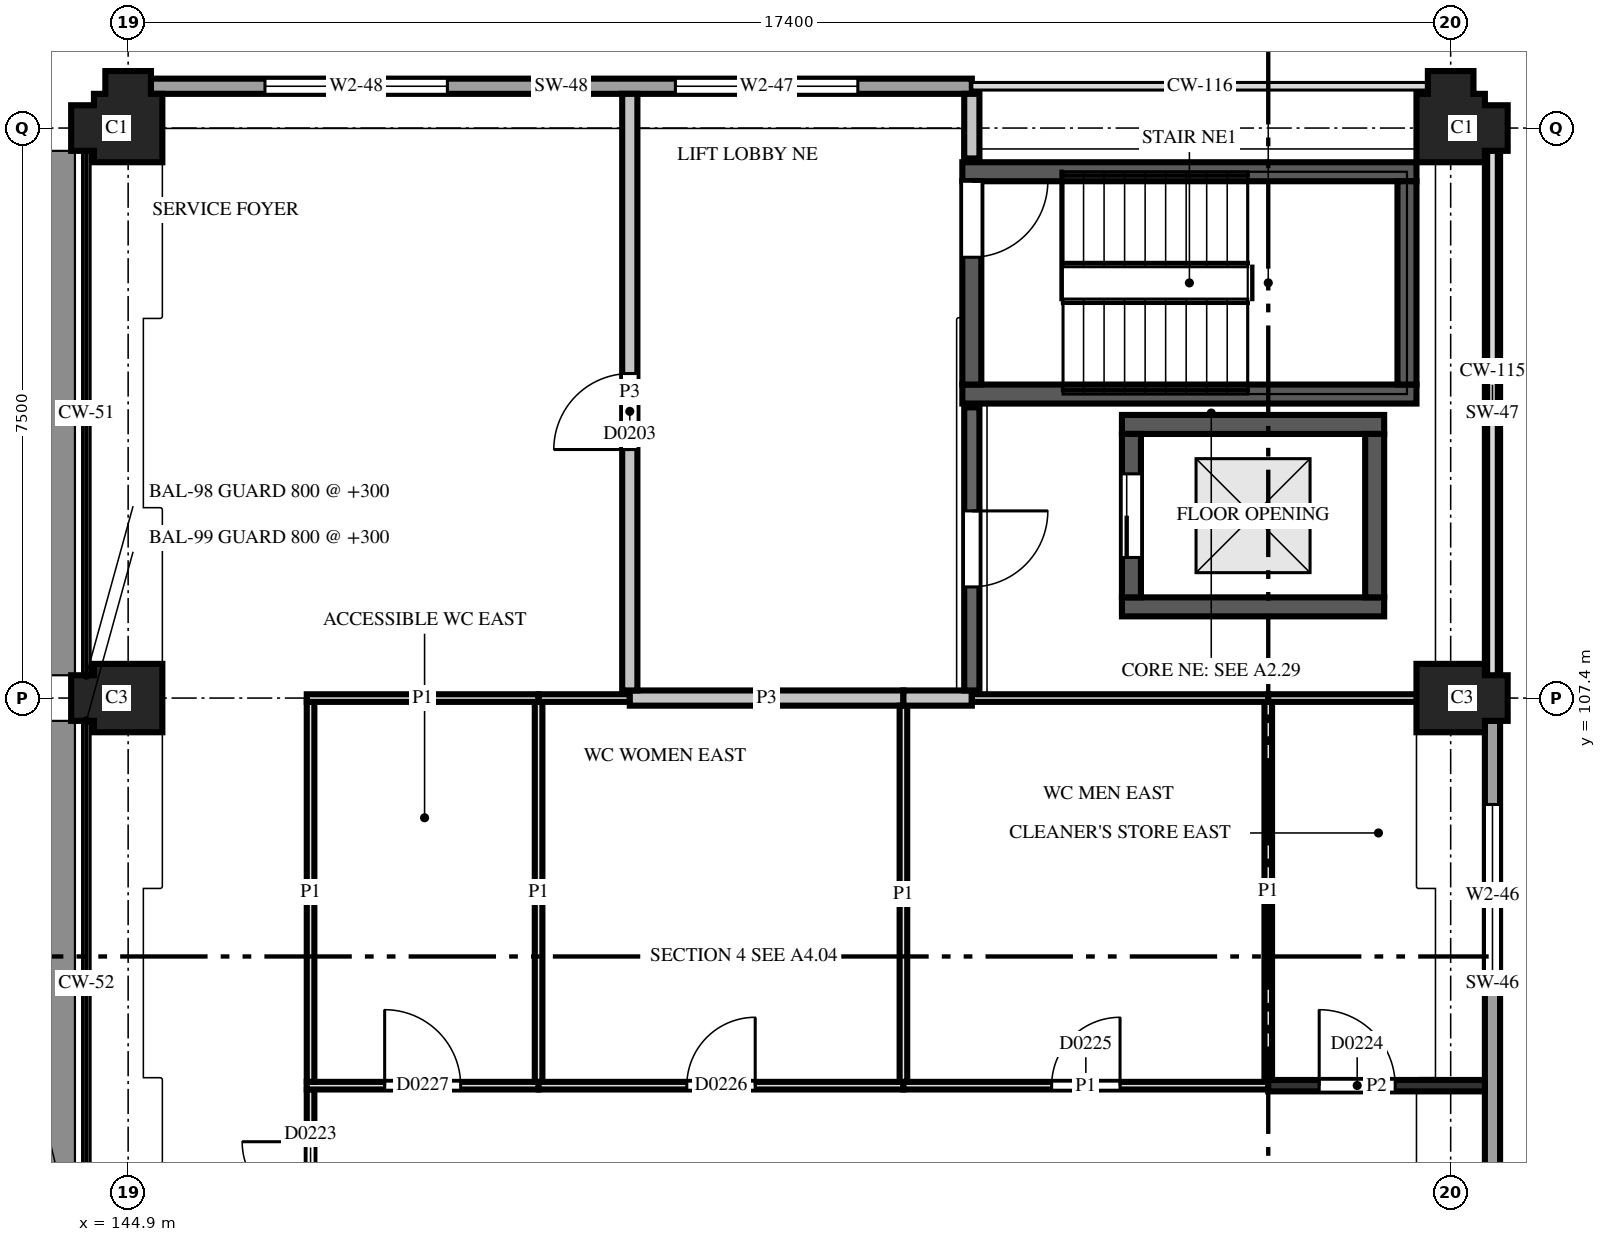
"""IFC4 building model, lengths in metres.
Left out: names, types, materials, properties, quantities, classifications, styles, units other than length and angle.
Written with IfcOpenShell. Run it as: python <this file> out.ifc"""

import sys

from ifc_helpers import new_model, si_unit, direction, frame, frame_2d, origin, place, context, subcontext, project, spatial, polyline, rectangle, outline, extrude, element, fill, save


model = new_model("IFC4")
c1 = context("Model", 3, precision=1e-05, world=origin(), true_north=direction((0.0, 1.0)))
c2 = subcontext(c1, "Body", "Model", "MODEL_VIEW")
j1 = project(units=[si_unit("LENGTHUNIT", "METRE"), si_unit("PLANEANGLEUNIT", "RADIAN")], contexts=[c1])
p1 = place(None, origin())
s1 = spatial("IfcSite", under=j1, at=p1, CompositionType="ELEMENT")
p2 = place(p1, origin())
s2 = spatial("IfcBuilding", under=s1, at=p2, CompositionType="ELEMENT")
p3 = place(p2, frame((0.0, 0.0, 8.2)))
s3 = spatial("IfcBuildingStorey", under=s2, at=p3, CompositionType="ELEMENT", Elevation=8.2)
for number, where, z_axis, x_axis in (
    (1, (144.9, 107.4, 0.0), (0.0, 0.0, 1.0), (-1.0, 0.0, 0.0)),
    (2, (162.3, 107.4, 0.0), (0.0, 0.0, 1.0), (1.0, 0.0, 0.0)),
):
    element("IfcColumn", number, at=place(p3, frame(where, z_axis=z_axis, x_axis=x_axis)), inside=s3, PredefinedType="COLUMN", context=c2, shape_type="SweptSolid", body=[
        extrude(outline(polyline([(-0.45, -0.45), (0.45, -0.45), (0.45, -0.3), (0.75, -0.3), (0.75, 0.3), (0.45, 0.3), (0.45, 0.45), (-0.45, 0.45), (-0.45, -0.45)])), origin(), (0.0, 0.0, 1.0), 3.7),
    ])
for number, where, z_axis, x_axis in (
    (3, (144.9, 114.9, 0.0), (0.0, 0.0, 1.0), (0.0, 1.0, 0.0)),
    (4, (162.3, 114.9, 0.0), (0.0, 0.0, 1.0), (1.0, 0.0, 0.0)),
):
    element("IfcColumn", number, at=place(p3, frame(where, z_axis=z_axis, x_axis=x_axis)), inside=s3, PredefinedType="COLUMN", context=c2, shape_type="SweptSolid", body=[
        extrude(outline(polyline([(-0.45, -0.45), (0.45, -0.45), (0.45, -0.3), (0.75, -0.3), (0.75, 0.3), (0.45, 0.3), (0.45, 0.45), (0.3, 0.45), (0.3, 0.75), (-0.3, 0.75), (-0.3, 0.45), (-0.45, 0.45), (-0.45, -0.45)])), origin(), (0.0, 0.0, 1.0), 3.7),
    ])
for number, where, z_axis, x_axis in (
    (5, (157.975, 108.6, 0.0), (0.0, 0.0, 1.0), (1.0, 0.0, 0.0)),
    (6, (157.975, 111.0, 0.0), (0.0, 0.0, 1.0), (1.0, 0.0, 0.0)),
):
    element("IfcWall", number, at=place(p3, frame(where, z_axis=z_axis, x_axis=x_axis)), inside=s3, PredefinedType="SHEAR", context=c2, shape_type="SweptSolid", body=[
        extrude(rectangle(XDim=3.45, YDim=0.25, at=frame_2d((1.725, 0.0))), origin(), (0.0, 0.0, 1.0), 3.7),
    ])
for number, where, z_axis, x_axis in (
    (7, (155.875, 111.4, 0.0), (0.0, 0.0, 1.0), (1.0, 0.0, 0.0)),
    (8, (155.875, 114.325, 0.0), (0.0, 0.0, 1.0), (1.0, 0.0, 0.0)),
):
    element("IfcWall", number, at=place(p3, frame(where, z_axis=z_axis, x_axis=x_axis)), inside=s3, PredefinedType="SHEAR", context=c2, shape_type="SweptSolid", body=[
        extrude(rectangle(XDim=5.975, YDim=0.25, at=frame_2d((2.988, 0.0))), origin(), (0.0, 0.0, 1.0), 3.7),
    ])
p4 = place(p3, frame((156.0, 111.525, 0.0), z_axis=(0.0, 0.0, 1.0), x_axis=(0.0, 1.0, 0.0)))
e9 = element("IfcWall", 9, at=p4, inside=s3, PredefinedType="SHEAR", context=c2, shape_type="SweptSolid", body=[
    extrude(rectangle(XDim=2.675, YDim=0.25, at=frame_2d((1.337, 0.0))), origin(), (0.0, 0.0, 1.0), 3.7),
])
p5 = place(p4, frame((1.675, 0.0, 0.0)))
e10 = element("IfcOpeningElement", 10, at=p5, cuts=e9, PredefinedType="OPENING", context=c2, shape_type="SweptSolid", body=[
    extrude(rectangle(XDim=1.0, YDim=2.1, at=frame_2d((0.5, 1.05))), frame((0.0, 0.135, 0.0), z_axis=(0.0, -1.0, 0.0), x_axis=(1.0, 0.0, 0.0)), (0.0, 0.0, 1.0), 0.27),
])
p6 = place(p3, frame((158.1, 108.725, 0.0), z_axis=(0.0, 0.0, 1.0), x_axis=(0.0, 1.0, 0.0)))
e11 = element("IfcWall", 11, at=p6, inside=s3, PredefinedType="SHEAR", context=c2, shape_type="SweptSolid", body=[
    extrude(rectangle(XDim=2.15, YDim=0.25, at=frame_2d((1.075, 0.0))), origin(), (0.0, 0.0, 1.0), 3.7),
])
p7 = place(p6, frame((0.525, 0.0, 0.0)))
e12 = element("IfcOpeningElement", 12, at=p7, cuts=e11, PredefinedType="OPENING", context=c2, shape_type="SweptSolid", body=[
    extrude(rectangle(XDim=1.1, YDim=2.1, at=frame_2d((0.55, 1.05))), frame((0.0, 0.135, 0.0), z_axis=(0.0, -1.0, 0.0), x_axis=(1.0, 0.0, 0.0)), (0.0, 0.0, 1.0), 0.27),
])
p8 = place(p3, frame((161.3, 108.725, 0.0), z_axis=(0.0, 0.0, 1.0), x_axis=(0.0, 1.0, 0.0)))
e13 = element("IfcWall", 13, at=p8, inside=s3, PredefinedType="SHEAR", context=c2, shape_type="SweptSolid", body=[
    extrude(rectangle(XDim=2.15, YDim=0.25, at=frame_2d((1.075, 0.0))), origin(), (0.0, 0.0, 1.0), 3.7),
])
p9 = place(p3, frame((161.725, 111.525, 0.0), z_axis=(0.0, 0.0, 1.0), x_axis=(0.0, 1.0, 0.0)))
e14 = element("IfcWall", 14, at=p9, inside=s3, PredefinedType="SHEAR", context=c2, shape_type="SweptSolid", body=[
    extrude(rectangle(XDim=2.675, YDim=0.25, at=frame_2d((1.337, 0.0))), origin(), (0.0, 0.0, 1.0), 3.7),
])
p10 = place(p3, frame((162.85, 100.2, 0.0), z_axis=(0.0, 0.0, 1.0), x_axis=(0.0, 1.0, 0.0)))
e15 = element("IfcWall", 15, at=p10, inside=s3, PredefinedType="SOLIDWALL", context=c2, shape_type="SweptSolid", body=[
    extrude(rectangle(XDim=6.9, YDim=0.2, at=frame_2d((3.45, 0.0))), origin(), (0.0, 0.0, 1.0), 2.3),
])
p11 = place(p10, frame((3.4, 0.0, 0.55)))
e16 = element("IfcOpeningElement", 16, at=p11, cuts=e15, PredefinedType="OPENING", context=c2, shape_type="SweptSolid", body=[
    extrude(rectangle(XDim=2.4, YDim=1.0, at=frame_2d((1.2, 0.5))), frame((0.0, 0.11, 0.0), z_axis=(0.0, -1.0, 0.0), x_axis=(1.0, 0.0, 0.0)), (0.0, 0.0, 1.0), 0.22),
])
p12 = place(p3, frame((162.85, 107.7, 0.0), z_axis=(0.0, 0.0, 1.0), x_axis=(0.0, 1.0, 0.0)))
e17 = element("IfcWall", 17, at=p12, inside=s3, PredefinedType="SOLIDWALL", context=c2, shape_type="SweptSolid", body=[
    extrude(rectangle(XDim=6.9, YDim=0.2, at=frame_2d((3.45, 0.0))), origin(), (0.0, 0.0, 1.0), 2.3),
])
p13 = place(p3, frame((156.0, 115.45, 0.0), z_axis=(0.0, 0.0, 1.0), x_axis=(-1.0, 0.0, 0.0)))
e18 = element("IfcWall", 18, at=p13, inside=s3, PredefinedType="SOLIDWALL", context=c2, shape_type="SweptSolid", body=[
    extrude(rectangle(XDim=10.8, YDim=0.2, at=frame_2d((5.4, 0.0))), origin(), (0.0, 0.0, 1.0), 1.7),
])
p14 = place(p13, frame((1.5, 0.0, 0.55)))
e19 = element("IfcOpeningElement", 19, at=p14, cuts=e18, PredefinedType="OPENING", context=c2, shape_type="SweptSolid", body=[
    extrude(rectangle(XDim=2.4, YDim=1.0, at=frame_2d((1.2, 0.5))), frame((0.0, 0.11, 0.0), z_axis=(0.0, -1.0, 0.0), x_axis=(1.0, 0.0, 0.0)), (0.0, 0.0, 1.0), 0.22),
])
p15 = place(p13, frame((6.9, 0.0, 0.55)))
e20 = element("IfcOpeningElement", 20, at=p15, cuts=e18, PredefinedType="OPENING", context=c2, shape_type="SweptSolid", body=[
    extrude(rectangle(XDim=2.4, YDim=1.0, at=frame_2d((1.2, 0.5))), frame((0.0, 0.11, 0.0), z_axis=(0.0, -1.0, 0.0), x_axis=(1.0, 0.0, 0.0)), (0.0, 0.0, 1.0), 0.22),
])
p16 = place(p3, frame((147.3, 102.25, 0.0), z_axis=(0.0, 0.0, 1.0), x_axis=(0.0, -1.0, 0.0)))
e21 = element("IfcWall", 21, at=p16, inside=s3, PredefinedType="PARTITIONING", context=c2, shape_type="SweptSolid", body=[
    extrude(rectangle(XDim=2.275, YDim=0.1, at=frame_2d((1.137, 0.0))), origin(), (0.0, 0.0, 1.0), 2.88),
])
p17 = place(p16, frame((0.688, 0.0, 0.0)))
e22 = element("IfcOpeningElement", 22, at=p17, cuts=e21, PredefinedType="OPENING", context=c2, shape_type="SweptSolid", body=[
    extrude(rectangle(XDim=0.9, YDim=2.1, at=frame_2d((0.45, 1.05))), frame((0.0, 0.06, 0.0), z_axis=(0.0, -1.0, 0.0), x_axis=(1.0, 0.0, 0.0)), (0.0, 0.0, 1.0), 0.12),
])
p18 = place(p3, frame((150.3, 102.3, 0.0), z_axis=(0.0, 0.0, 1.0), x_axis=(-1.0, 0.0, 0.0)))
e23 = element("IfcWall", 23, at=p18, inside=s3, PredefinedType="PARTITIONING", context=c2, shape_type="SweptSolid", body=[
    extrude(rectangle(XDim=3.05, YDim=0.1, at=frame_2d((1.525, 0.0))), origin(), (0.0, 0.0, 1.0), 2.88),
])
p19 = place(p18, frame((1.025, 0.0, 0.0)))
e24 = element("IfcOpeningElement", 24, at=p19, cuts=e23, PredefinedType="OPENING", context=c2, shape_type="SweptSolid", body=[
    extrude(rectangle(XDim=1.0, YDim=2.1, at=frame_2d((0.5, 1.05))), frame((0.0, 0.06, 0.0), z_axis=(0.0, -1.0, 0.0), x_axis=(1.0, 0.0, 0.0)), (0.0, 0.0, 1.0), 0.12),
])
p20 = place(p3, frame((155.1, 102.3, 0.0), z_axis=(0.0, 0.0, 1.0), x_axis=(-1.0, 0.0, 0.0)))
e25 = element("IfcWall", 25, at=p20, inside=s3, PredefinedType="PARTITIONING", context=c2, shape_type="SweptSolid", body=[
    extrude(rectangle(XDim=4.8, YDim=0.1, at=frame_2d((2.4, 0.0))), origin(), (0.0, 0.0, 1.0), 2.88),
])
p21 = place(p20, frame((1.95, 0.0, 0.0)))
e26 = element("IfcOpeningElement", 26, at=p21, cuts=e25, PredefinedType="OPENING", context=c2, shape_type="SweptSolid", body=[
    extrude(rectangle(XDim=0.9, YDim=2.1, at=frame_2d((0.45, 1.05))), frame((0.0, 0.06, 0.0), z_axis=(0.0, -1.0, 0.0), x_axis=(1.0, 0.0, 0.0)), (0.0, 0.0, 1.0), 0.12),
])
p22 = place(p3, frame((159.9, 102.3, 0.0), z_axis=(0.0, 0.0, 1.0), x_axis=(-1.0, 0.0, 0.0)))
e27 = element("IfcWall", 27, at=p22, inside=s3, PredefinedType="PARTITIONING", context=c2, shape_type="SweptSolid", body=[
    extrude(rectangle(XDim=4.8, YDim=0.1, at=frame_2d((2.4, 0.0))), origin(), (0.0, 0.0, 1.0), 2.88),
])
p23 = place(p22, frame((1.95, 0.0, 0.0)))
e28 = element("IfcOpeningElement", 28, at=p23, cuts=e27, PredefinedType="OPENING", context=c2, shape_type="SweptSolid", body=[
    extrude(rectangle(XDim=0.9, YDim=2.1, at=frame_2d((0.45, 1.05))), frame((0.0, 0.06, 0.0), z_axis=(0.0, -1.0, 0.0), x_axis=(1.0, 0.0, 0.0)), (0.0, 0.0, 1.0), 0.12),
])
p24 = place(p3, frame((162.75, 102.3, 0.0), z_axis=(0.0, 0.0, 1.0), x_axis=(-1.0, 0.0, 0.0)))
e29 = element("IfcWall", 29, at=p24, inside=s3, PredefinedType="PARTITIONING", context=c2, shape_type="SweptSolid", body=[
    extrude(rectangle(XDim=2.85, YDim=0.15, at=frame_2d((1.425, 0.0))), origin(), (0.0, 0.0, 1.0), 2.88),
])
p25 = place(p24, frame((1.18, 0.0, 0.0)))
e30 = element("IfcOpeningElement", 30, at=p25, cuts=e29, PredefinedType="OPENING", context=c2, shape_type="SweptSolid", body=[
    extrude(rectangle(XDim=1.0, YDim=2.1, at=frame_2d((0.5, 1.05))), frame((0.0, 0.085, 0.0), z_axis=(0.0, -1.0, 0.0), x_axis=(1.0, 0.0, 0.0)), (0.0, 0.0, 1.0), 0.17),
])
for number, where, z_axis, x_axis in (
    (31, (147.3, 107.35, 0.0), (0.0, 0.0, 1.0), (0.0, -1.0, 0.0)),
    (32, (150.3, 107.35, 0.0), (0.0, 0.0, 1.0), (0.0, -1.0, 0.0)),
):
    element("IfcWall", number, at=place(p3, frame(where, z_axis=z_axis, x_axis=x_axis)), inside=s3, PredefinedType="PARTITIONING", context=c2, shape_type="SweptSolid", body=[
        extrude(rectangle(XDim=5.0, YDim=0.1, at=frame_2d((2.5, 0.0))), origin(), (0.0, 0.0, 1.0), 2.88),
    ])
p26 = place(p3, frame((150.3, 107.4, 0.0), z_axis=(0.0, 0.0, 1.0), x_axis=(-1.0, 0.0, 0.0)))
e33 = element("IfcWall", 33, at=p26, inside=s3, PredefinedType="PARTITIONING", context=c2, shape_type="SweptSolid", body=[
    extrude(rectangle(XDim=3.05, YDim=0.1, at=frame_2d((1.525, 0.0))), origin(), (0.0, 0.0, 1.0), 2.88),
])
p27 = place(p3, frame((151.5, 107.4, 0.0), z_axis=(0.0, 0.0, 1.0), x_axis=(-1.0, 0.0, 0.0)))
e34 = element("IfcWall", 34, at=p27, inside=s3, PredefinedType="PARTITIONING", context=c2, shape_type="SweptSolid", body=[
    extrude(rectangle(XDim=1.2, YDim=0.1, at=frame_2d((0.6, 0.0))), origin(), (0.0, 0.0, 1.0), 2.88),
])
p28 = place(p3, frame((151.5, 107.4, 0.0), z_axis=(0.0, 0.0, 1.0), x_axis=(1.0, 0.0, 0.0)))
e35 = element("IfcWall", 35, at=p28, inside=s3, PredefinedType="PARTITIONING", context=c2, shape_type="SweptSolid", body=[
    extrude(rectangle(XDim=3.6, YDim=0.2, at=frame_2d((1.8, 0.0))), origin(), (0.0, 0.0, 1.0), 2.88),
])
p29 = place(p3, frame((155.1, 107.3, 0.0), z_axis=(0.0, 0.0, 1.0), x_axis=(0.0, -1.0, 0.0)))
e36 = element("IfcWall", 36, at=p29, inside=s3, PredefinedType="PARTITIONING", context=c2, shape_type="SweptSolid", body=[
    extrude(rectangle(XDim=4.95, YDim=0.1, at=frame_2d((2.475, 0.0))), origin(), (0.0, 0.0, 1.0), 2.88),
])
p30 = place(p3, frame((155.1, 107.4, 0.0), z_axis=(0.0, 0.0, 1.0), x_axis=(1.0, 0.0, 0.0)))
e37 = element("IfcWall", 37, at=p30, inside=s3, PredefinedType="PARTITIONING", context=c2, shape_type="SweptSolid", body=[
    extrude(rectangle(XDim=0.9, YDim=0.2, at=frame_2d((0.45, 0.0))), origin(), (0.0, 0.0, 1.0), 2.88),
])
p31 = place(p3, frame((156.0, 107.5, 0.0), z_axis=(0.0, 0.0, 1.0), x_axis=(0.0, 1.0, 0.0)))
e38 = element("IfcWall", 38, at=p31, inside=s3, PredefinedType="PARTITIONING", context=c2, shape_type="SweptSolid", body=[
    extrude(rectangle(XDim=3.725, YDim=0.2, at=frame_2d((1.863, 0.0))), origin(), (0.0, 0.0, 1.0), 2.88),
])
p32 = place(p31, frame((1.363, 0.0, 0.0)))
e39 = element("IfcOpeningElement", 39, at=p32, cuts=e38, PredefinedType="OPENING", context=c2, shape_type="SweptSolid", body=[
    extrude(rectangle(XDim=1.0, YDim=2.1, at=frame_2d((0.5, 1.05))), frame((0.0, 0.11, 0.0), z_axis=(0.0, -1.0, 0.0), x_axis=(1.0, 0.0, 0.0)), (0.0, 0.0, 1.0), 0.22),
])
p33 = place(p3, frame((159.9, 107.35, 0.0), z_axis=(0.0, 0.0, 1.0), x_axis=(0.0, -1.0, 0.0)))
e40 = element("IfcWall", 40, at=p33, inside=s3, PredefinedType="PARTITIONING", context=c2, shape_type="SweptSolid", body=[
    extrude(rectangle(XDim=4.975, YDim=0.1, at=frame_2d((2.488, 0.0))), origin(), (0.0, 0.0, 1.0), 2.88),
])
p34 = place(p3, frame((159.9, 107.4, 0.0), z_axis=(0.0, 0.0, 1.0), x_axis=(-1.0, 0.0, 0.0)))
e41 = element("IfcWall", 41, at=p34, inside=s3, PredefinedType="PARTITIONING", context=c2, shape_type="SweptSolid", body=[
    extrude(rectangle(XDim=3.9, YDim=0.1, at=frame_2d((1.95, 0.0))), origin(), (0.0, 0.0, 1.0), 2.88),
])
p35 = place(p3, frame((162.24, 107.4, 0.0), z_axis=(0.0, 0.0, 1.0), x_axis=(-1.0, 0.0, 0.0)))
e42 = element("IfcWall", 42, at=p35, inside=s3, PredefinedType="PARTITIONING", context=c2, shape_type="SweptSolid", body=[
    extrude(rectangle(XDim=2.34, YDim=0.1, at=frame_2d((1.17, 0.0))), origin(), (0.0, 0.0, 1.0), 2.88),
])
p36 = place(p3, frame((156.0, 114.5, 0.0), z_axis=(0.0, 0.0, 1.0), x_axis=(0.0, 1.0, 0.0)))
e43 = element("IfcWall", 43, at=p36, inside=s3, PredefinedType="PARTITIONING", context=c2, shape_type="SweptSolid", body=[
    extrude(rectangle(XDim=0.85, YDim=0.2, at=frame_2d((0.425, 0.0))), origin(), (0.0, 0.0, 1.0), 2.88),
])
p37 = place(p3, frame((151.5, 115.35, 0.0), z_axis=(0.0, 0.0, 1.0), x_axis=(0.0, -1.0, 0.0)))
e44 = element("IfcWall", 44, at=p37, inside=s3, PredefinedType="PARTITIONING", context=c2, shape_type="SweptSolid", body=[
    extrude(rectangle(XDim=7.85, YDim=0.2, at=frame_2d((3.925, 0.0))), origin(), (0.0, 0.0, 1.0), 2.88),
])
p38 = place(p37, frame((3.68, 0.0, 0.0)))
e45 = element("IfcOpeningElement", 45, at=p38, cuts=e44, PredefinedType="OPENING", context=c2, shape_type="SweptSolid", body=[
    extrude(rectangle(XDim=1.0, YDim=2.1, at=frame_2d((0.5, 1.05))), frame((0.0, 0.11, 0.0), z_axis=(0.0, -1.0, 0.0), x_axis=(1.0, 0.0, 0.0)), (0.0, 0.0, 1.0), 0.22),
])
p39 = place(p11, origin())
e46 = element("IfcWindow", 46, at=p39, inside=s3, PartitioningType="SINGLE_PANEL", PredefinedType="WINDOW", context=c2, shape_type="SweptSolid", body=[
    extrude(rectangle(XDim=2.4, YDim=1.0, at=frame_2d((1.2, 0.5))), frame((0.0, 0.03, 0.0), z_axis=(0.0, -1.0, 0.0), x_axis=(1.0, 0.0, 0.0)), (0.0, 0.0, 1.0), 0.06),
])
fill(e16, e46)
p40 = place(p14, origin())
e47 = element("IfcWindow", 47, at=p40, inside=s3, PartitioningType="SINGLE_PANEL", PredefinedType="WINDOW", context=c2, shape_type="SweptSolid", body=[
    extrude(rectangle(XDim=2.4, YDim=1.0, at=frame_2d((1.2, 0.5))), frame((0.0, 0.03, 0.0), z_axis=(0.0, -1.0, 0.0), x_axis=(1.0, 0.0, 0.0)), (0.0, 0.0, 1.0), 0.06),
])
fill(e19, e47)
p41 = place(p15, origin())
e48 = element("IfcWindow", 48, at=p41, inside=s3, PartitioningType="SINGLE_PANEL", PredefinedType="WINDOW", context=c2, shape_type="SweptSolid", body=[
    extrude(rectangle(XDim=2.4, YDim=1.0, at=frame_2d((1.2, 0.5))), frame((0.0, 0.03, 0.0), z_axis=(0.0, -1.0, 0.0), x_axis=(1.0, 0.0, 0.0)), (0.0, 0.0, 1.0), 0.06),
])
fill(e20, e48)
p42 = place(p38, origin())
e49 = element("IfcDoor", 49, at=p42, inside=s3, OperationType="SINGLE_SWING_RIGHT", PredefinedType="DOOR", context=c2, shape_type="SweptSolid", body=[
    extrude(rectangle(XDim=1.0, YDim=2.1, at=frame_2d((0.5, 1.05))), frame((0.0, 0.025, 0.0), z_axis=(0.0, -1.0, 0.0), x_axis=(1.0, 0.0, 0.0)), (0.0, 0.0, 1.0), 0.05),
])
fill(e45, e49)
p43 = place(p17, origin())
e50 = element("IfcDoor", 50, at=p43, inside=s3, OperationType="SINGLE_SWING_LEFT", PredefinedType="DOOR", context=c2, shape_type="SweptSolid", body=[
    extrude(rectangle(XDim=0.9, YDim=2.1, at=frame_2d((0.45, 1.05))), frame((0.0, 0.025, 0.0), z_axis=(0.0, -1.0, 0.0), x_axis=(1.0, 0.0, 0.0)), (0.0, 0.0, 1.0), 0.05),
])
fill(e22, e50)
p44 = place(p25, origin())
e51 = element("IfcDoor", 51, at=p44, inside=s3, OperationType="SINGLE_SWING_RIGHT", PredefinedType="DOOR", context=c2, shape_type="SweptSolid", body=[
    extrude(rectangle(XDim=1.0, YDim=2.1, at=frame_2d((0.5, 1.05))), frame((0.0, 0.025, 0.0), z_axis=(0.0, -1.0, 0.0), x_axis=(1.0, 0.0, 0.0)), (0.0, 0.0, 1.0), 0.05),
])
fill(e30, e51)
p45 = place(p23, origin())
e52 = element("IfcDoor", 52, at=p45, inside=s3, OperationType="SINGLE_SWING_LEFT", PredefinedType="DOOR", context=c2, shape_type="SweptSolid", body=[
    extrude(rectangle(XDim=0.9, YDim=2.1, at=frame_2d((0.45, 1.05))), frame((0.0, 0.025, 0.0), z_axis=(0.0, -1.0, 0.0), x_axis=(1.0, 0.0, 0.0)), (0.0, 0.0, 1.0), 0.05),
])
fill(e28, e52)
p46 = place(p21, origin())
e53 = element("IfcDoor", 53, at=p46, inside=s3, OperationType="SINGLE_SWING_LEFT", PredefinedType="DOOR", context=c2, shape_type="SweptSolid", body=[
    extrude(rectangle(XDim=0.9, YDim=2.1, at=frame_2d((0.45, 1.05))), frame((0.0, 0.025, 0.0), z_axis=(0.0, -1.0, 0.0), x_axis=(1.0, 0.0, 0.0)), (0.0, 0.0, 1.0), 0.05),
])
fill(e26, e53)
p47 = place(p19, origin())
e54 = element("IfcDoor", 54, at=p47, inside=s3, OperationType="SINGLE_SWING_RIGHT", PredefinedType="DOOR", context=c2, shape_type="SweptSolid", body=[
    extrude(rectangle(XDim=1.0, YDim=2.1, at=frame_2d((0.5, 1.05))), frame((0.0, 0.025, 0.0), z_axis=(0.0, -1.0, 0.0), x_axis=(1.0, 0.0, 0.0)), (0.0, 0.0, 1.0), 0.05),
])
fill(e24, e54)
p48 = place(p7, origin())
e55 = element("IfcDoor", 55, at=p48, inside=s3, OperationType="SLIDING_TO_LEFT", PredefinedType="DOOR", context=c2, shape_type="SweptSolid", body=[
    extrude(rectangle(XDim=1.1, YDim=2.1, at=frame_2d((0.55, 1.05))), frame((0.0, 0.025, 0.0), z_axis=(0.0, -1.0, 0.0), x_axis=(1.0, 0.0, 0.0)), (0.0, 0.0, 1.0), 0.05),
])
fill(e12, e55)
p49 = place(p5, origin())
e56 = element("IfcDoor", 56, at=p49, inside=s3, OperationType="SINGLE_SWING_RIGHT", PredefinedType="DOOR", context=c2, shape_type="SweptSolid", body=[
    extrude(rectangle(XDim=1.0, YDim=2.1, at=frame_2d((0.5, 1.05))), frame((0.0, 0.025, 0.0), z_axis=(0.0, -1.0, 0.0), x_axis=(1.0, 0.0, 0.0)), (0.0, 0.0, 1.0), 0.05),
])
fill(e10, e56)
p50 = place(p32, origin())
e57 = element("IfcDoor", 57, at=p50, inside=s3, OperationType="SINGLE_SWING_RIGHT", PredefinedType="DOOR", context=c2, shape_type="SweptSolid", body=[
    extrude(rectangle(XDim=1.0, YDim=2.1, at=frame_2d((0.5, 1.05))), frame((0.0, 0.025, 0.0), z_axis=(0.0, -1.0, 0.0), x_axis=(1.0, 0.0, 0.0)), (0.0, 0.0, 1.0), 0.05),
])
fill(e39, e57)
save(model, sys.argv[1])
